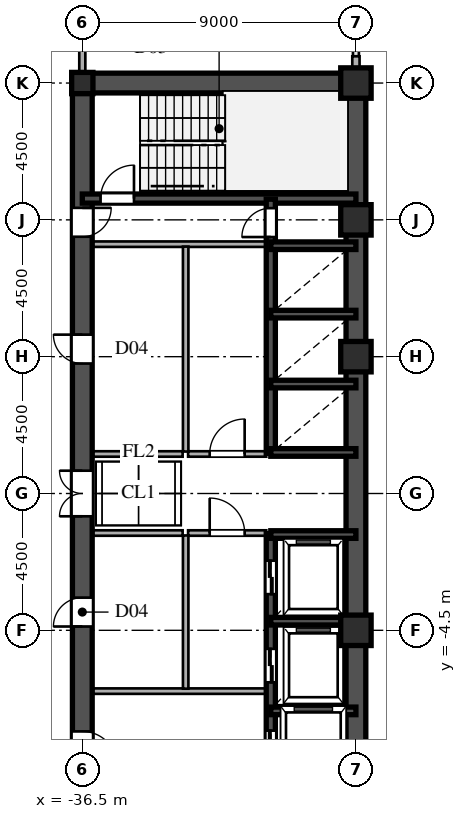
"""IFC4 building model, lengths in metres.
Left out: names, types, materials, properties, quantities, classifications, styles, units other than length and angle.
Written with IfcOpenShell. Run it as: python <this file> out.ifc"""

import sys

from ifc_helpers import new_model, si_unit, direction, frame, frame_2d, origin, origin_2d, place, context, subcontext, project, spatial, rectangle, hollow_rectangle, i_section, extrude, source, transform, mapped, element, fill, save


model = new_model("IFC4")
c1 = context("Model", 3, precision=1e-05, world=origin(), true_north=direction((0.0, 1.0)))
c2 = subcontext(c1, "Body", "Model", "MODEL_VIEW")
j1 = project(units=[si_unit("LENGTHUNIT", "METRE"), si_unit("PLANEANGLEUNIT", "RADIAN")], contexts=[c1])
p1 = place(None, origin())
s1 = spatial("IfcSite", under=j1, at=p1, CompositionType="ELEMENT")
p2 = place(p1, origin())
s2 = spatial("IfcBuilding", under=s1, at=p2, CompositionType="ELEMENT")
p3 = place(p2, frame((0.0, 0.0, 110.4)))
s3 = spatial("IfcBuildingStorey", under=s2, at=p3, CompositionType="ELEMENT", Elevation=110.4)
m1 = source(origin(), c2, "Body", "SweptSolid", [
    extrude(hollow_rectangle(XDim=1.0, YDim=1.0, WallThickness=0.042, at=origin_2d()), origin(), (0.0, 0.0, 1.0), 3.6),
])
for number, where, z_axis, x_axis in (
    (1, (-27.5, -4.5, 0.0), (0.0, 0.0, 1.0), (1.0, 0.0, 0.0)),
    (2, (-27.5, 4.5, 0.0), (0.0, 0.0, 1.0), (1.0, 0.0, 0.0)),
    (3, (-27.5, 9.0, 0.0), (0.0, 0.0, 1.0), (1.0, 0.0, 0.0)),
    (4, (-27.5, 13.5, 0.0), (0.0, 0.0, 1.0), (1.0, 0.0, 0.0)),
):
    element("IfcColumn", number, at=place(p3, frame(where, z_axis=z_axis, x_axis=x_axis)), inside=s3, PredefinedType="COLUMN", context=c2, shape_type="MappedRepresentation", body=[
        mapped(m1, transform((0.0, 0.0, 0.0), scale=1.0)),
    ])
m2 = source(origin(), c2, "Body", "SweptSolid", [
    extrude(i_section(OverallWidth=0.7, OverallDepth=0.7, WebThickness=0.028, FlangeThickness=0.045, at=origin_2d()), origin(), (0.0, 0.0, 1.0), 3.6),
])
p4 = place(p3, frame((-36.5, 13.5, 0.0), z_axis=(0.0, 0.0, 1.0), x_axis=(1.0, 0.0, 0.0)))
e5 = element("IfcColumn", 5, at=p4, inside=s3, PredefinedType="COLUMN", context=c2, shape_type="MappedRepresentation", body=[
    mapped(m2, transform((0.0, 0.0, 0.0), scale=1.0)),
])
p5 = place(p3, frame((-27.5, 13.83, 0.0), z_axis=(0.0, 0.0, 1.0), x_axis=(0.0, 1.0, 0.0)))
e6 = element("IfcWall", 6, at=p5, inside=s3, PredefinedType="SOLIDWALL", context=c2, shape_type="SweptSolid", body=[
    extrude(rectangle(XDim=0.55, YDim=0.24, at=frame_2d((0.275, 0.0))), origin(), (0.0, 0.0, 1.0), 2.88),
])
for number, where, z_axis, x_axis in (
    (7, (-27.5, -13.5, 0.0), (0.0, 0.0, 1.0), (0.0, 1.0, 0.0)),
    (8, (-27.5, 1.3, 0.0), (0.0, 0.0, 1.0), (0.0, 1.0, 0.0)),
):
    element("IfcWall", number, at=place(p3, frame(where, z_axis=z_axis, x_axis=x_axis)), inside=s3, PredefinedType="SHEAR", context=c2, shape_type="SweptSolid", body=[
        extrude(rectangle(XDim=12.2, YDim=0.65, at=frame_2d((6.1, 0.0))), origin(), (0.0, 0.0, 1.0), 3.38),
    ])
p6 = place(p3, frame((-27.5, -1.3, 0.0), z_axis=(0.0, 0.0, 1.0), x_axis=(0.0, 1.0, 0.0)))
e9 = element("IfcWall", 9, at=p6, inside=s3, PredefinedType="SHEAR", context=c2, shape_type="SweptSolid", body=[
    extrude(rectangle(XDim=2.6, YDim=0.65, at=frame_2d((1.3, 0.0))), origin(), (0.0, 0.0, 1.0), 3.38),
])
p7 = place(p3, frame((-36.5, 13.5, 0.0), z_axis=(0.0, 0.0, 1.0), x_axis=(1.0, 0.0, 0.0)))
e10 = element("IfcWall", 10, at=p7, inside=s3, PredefinedType="SHEAR", context=c2, shape_type="SweptSolid", body=[
    extrude(rectangle(XDim=9.0, YDim=0.65, at=frame_2d((4.5, 0.0))), origin(), (0.0, 0.0, 1.0), 3.38),
])
p8 = place(p3, frame((-36.5, -13.65, 0.0), z_axis=(0.0, 0.0, 1.0), x_axis=(0.0, 1.0, 0.0)))
e11 = element("IfcWall", 11, at=p8, inside=s3, PredefinedType="SHEAR", context=c2, shape_type="SweptSolid", body=[
    extrude(rectangle(XDim=7.15, YDim=0.65, at=frame_2d((3.575, 0.0))), origin(), (0.0, 0.0, 1.0), 3.38),
])
p9 = place(p8, frame((4.675, 0.0, 0.0)))
e12 = element("IfcOpeningElement", 12, at=p9, cuts=e11, PredefinedType="OPENING", context=c2, shape_type="SweptSolid", body=[
    extrude(rectangle(XDim=1.15, YDim=2.2, at=frame_2d((0.575, 1.1))), frame((0.0, 0.335, 0.0), z_axis=(0.0, -1.0, 0.0), x_axis=(1.0, 0.0, 0.0)), (0.0, 0.0, 1.0), 0.67),
])
p10 = place(p3, frame((-36.5, -1.3, 0.0), z_axis=(0.0, 0.0, 1.0), x_axis=(0.0, 1.0, 0.0)))
e13 = element("IfcWall", 13, at=p10, inside=s3, PredefinedType="SHEAR", context=c2, shape_type="SweptSolid", body=[
    extrude(rectangle(XDim=2.6, YDim=0.65, at=frame_2d((1.3, 0.0))), origin(), (0.0, 0.0, 1.0), 3.38),
])
p11 = place(p10, frame((0.55, 0.0, 0.0)))
e14 = element("IfcOpeningElement", 14, at=p11, cuts=e13, PredefinedType="OPENING", context=c2, shape_type="SweptSolid", body=[
    extrude(rectangle(XDim=1.5, YDim=2.3, at=frame_2d((0.75, 1.15))), frame((0.0, 0.335, 0.0), z_axis=(0.0, -1.0, 0.0), x_axis=(1.0, 0.0, 0.0)), (0.0, 0.0, 1.0), 0.67),
])
p12 = place(p3, frame((-36.5, 8.2, 0.0), z_axis=(0.0, 0.0, 1.0), x_axis=(0.0, 1.0, 0.0)))
e15 = element("IfcWall", 15, at=p12, inside=s3, PredefinedType="SHEAR", context=c2, shape_type="SweptSolid", body=[
    extrude(rectangle(XDim=5.45, YDim=0.65, at=frame_2d((2.725, 0.0))), origin(), (0.0, 0.0, 1.0), 3.38),
])
p13 = place(p12, frame((0.245, 0.0, 0.0)))
e16 = element("IfcOpeningElement", 16, at=p13, cuts=e15, PredefinedType="OPENING", context=c2, shape_type="SweptSolid", body=[
    extrude(rectangle(XDim=0.95, YDim=2.15, at=frame_2d((0.475, 1.075))), frame((0.0, 0.335, 0.0), z_axis=(0.0, -1.0, 0.0), x_axis=(1.0, 0.0, 0.0)), (0.0, 0.0, 1.0), 0.67),
])
p14 = place(p3, frame((-36.5, -6.5, 0.0), z_axis=(0.0, 0.0, 1.0), x_axis=(0.0, 1.0, 0.0)))
e17 = element("IfcWall", 17, at=p14, inside=s3, PredefinedType="SHEAR", context=c2, shape_type="SweptSolid", body=[
    extrude(rectangle(XDim=5.2, YDim=0.65, at=frame_2d((2.6, 0.0))), origin(), (0.0, 0.0, 1.0), 3.38),
])
p15 = place(p14, frame((2.125, 0.0, 0.0)))
e18 = element("IfcOpeningElement", 18, at=p15, cuts=e17, PredefinedType="OPENING", context=c2, shape_type="SweptSolid", body=[
    extrude(rectangle(XDim=0.95, YDim=2.15, at=frame_2d((0.475, 1.075))), frame((0.0, 0.335, 0.0), z_axis=(0.0, -1.0, 0.0), x_axis=(1.0, 0.0, 0.0)), (0.0, 0.0, 1.0), 0.67),
])
p16 = place(p3, frame((-36.5, 1.3, 0.0), z_axis=(0.0, 0.0, 1.0), x_axis=(0.0, 1.0, 0.0)))
e19 = element("IfcWall", 19, at=p16, inside=s3, PredefinedType="SHEAR", context=c2, shape_type="SweptSolid", body=[
    extrude(rectangle(XDim=6.9, YDim=0.65, at=frame_2d((3.45, 0.0))), origin(), (0.0, 0.0, 1.0), 3.38),
])
p17 = place(p16, frame((2.975, 0.0, 0.0)))
e20 = element("IfcOpeningElement", 20, at=p17, cuts=e19, PredefinedType="OPENING", context=c2, shape_type="SweptSolid", body=[
    extrude(rectangle(XDim=0.95, YDim=2.15, at=frame_2d((0.475, 1.075))), frame((0.0, 0.335, 0.0), z_axis=(0.0, -1.0, 0.0), x_axis=(1.0, 0.0, 0.0)), (0.0, 0.0, 1.0), 0.67),
])
p18 = place(p3, frame((-36.5, 9.7, 0.0), z_axis=(0.0, 0.0, 1.0), x_axis=(1.0, 0.0, 0.0)))
e21 = element("IfcWall", 21, at=p18, inside=s3, PredefinedType="SHEAR", context=c2, shape_type="SweptSolid", body=[
    extrude(rectangle(XDim=9.0, YDim=0.3, at=frame_2d((4.5, 0.0))), origin(), (0.0, 0.0, 1.0), 3.38),
])
p19 = place(p18, frame((0.6, 0.0, 0.0)))
e22 = element("IfcOpeningElement", 22, at=p19, cuts=e21, PredefinedType="OPENING", context=c2, shape_type="SweptSolid", body=[
    extrude(rectangle(XDim=1.1, YDim=2.2, at=frame_2d((0.55, 1.1))), frame((0.0, 0.16, 0.0), z_axis=(0.0, -1.0, 0.0), x_axis=(1.0, 0.0, 0.0)), (0.0, 0.0, 1.0), 0.32),
])
for number, where, z_axis, x_axis in (
    (23, (-30.3, -7.15, 0.0), (0.0, 0.0, 1.0), (1.0, 0.0, 0.0)),
    (24, (-30.3, -4.2, 0.0), (0.0, 0.0, 1.0), (1.0, 0.0, 0.0)),
    (25, (-30.3, -1.35, 0.0), (0.0, 0.0, 1.0), (1.0, 0.0, 0.0)),
    (26, (-30.3, 1.35, 0.0), (0.0, 0.0, 1.0), (1.0, 0.0, 0.0)),
    (27, (-30.3, 3.6, 0.0), (0.0, 0.0, 1.0), (1.0, 0.0, 0.0)),
    (28, (-30.3, 5.9, 0.0), (0.0, 0.0, 1.0), (1.0, 0.0, 0.0)),
    (29, (-30.3, 8.15, 0.0), (0.0, 0.0, 1.0), (1.0, 0.0, 0.0)),
):
    element("IfcWall", number, at=place(p3, frame(where, z_axis=z_axis, x_axis=x_axis)), inside=s3, PredefinedType="SHEAR", context=c2, shape_type="SweptSolid", body=[
        extrude(rectangle(XDim=2.8, YDim=0.25, at=frame_2d((1.4, 0.0))), origin(), (0.0, 0.0, 1.0), 3.38),
    ])
p20 = place(p3, frame((-30.3, -9.68, 0.0), z_axis=(0.0, 0.0, 1.0), x_axis=(0.0, 1.0, 0.0)))
e30 = element("IfcWall", 30, at=p20, inside=s3, PredefinedType="SHEAR", context=c2, shape_type="SweptSolid", body=[
    extrude(rectangle(XDim=2.56, YDim=0.3, at=frame_2d((1.28, 0.0))), origin(), (0.0, 0.0, 1.0), 3.38),
])
p21 = place(p20, frame((0.68, 0.0, 0.0)))
e31 = element("IfcOpeningElement", 31, at=p21, cuts=e30, PredefinedType="OPENING", context=c2, shape_type="SweptSolid", body=[
    extrude(rectangle(XDim=1.2, YDim=2.25, at=frame_2d((0.6, 1.125))), frame((0.0, 0.16, 0.0), z_axis=(0.0, -1.0, 0.0), x_axis=(1.0, 0.0, 0.0)), (0.0, 0.0, 1.0), 0.32),
])
p22 = place(p3, frame((-30.3, -7.12, 0.0), z_axis=(0.0, 0.0, 1.0), x_axis=(0.0, 1.0, 0.0)))
e32 = element("IfcWall", 32, at=p22, inside=s3, PredefinedType="SHEAR", context=c2, shape_type="SweptSolid", body=[
    extrude(rectangle(XDim=2.92, YDim=0.3, at=frame_2d((1.46, 0.0))), origin(), (0.0, 0.0, 1.0), 3.38),
])
p23 = place(p22, frame((0.91, 0.0, 0.0)))
e33 = element("IfcOpeningElement", 33, at=p23, cuts=e32, PredefinedType="OPENING", context=c2, shape_type="SweptSolid", body=[
    extrude(rectangle(XDim=1.1, YDim=2.2, at=frame_2d((0.55, 1.1))), frame((0.0, 0.16, 0.0), z_axis=(0.0, -1.0, 0.0), x_axis=(1.0, 0.0, 0.0)), (0.0, 0.0, 1.0), 0.32),
])
p24 = place(p3, frame((-30.3, -4.2, 0.0), z_axis=(0.0, 0.0, 1.0), x_axis=(0.0, 1.0, 0.0)))
e34 = element("IfcWall", 34, at=p24, inside=s3, PredefinedType="SHEAR", context=c2, shape_type="SweptSolid", body=[
    extrude(rectangle(XDim=2.88, YDim=0.3, at=frame_2d((1.44, 0.0))), origin(), (0.0, 0.0, 1.0), 3.38),
])
p25 = place(p24, frame((0.89, 0.0, 0.0)))
e35 = element("IfcOpeningElement", 35, at=p25, cuts=e34, PredefinedType="OPENING", context=c2, shape_type="SweptSolid", body=[
    extrude(rectangle(XDim=1.1, YDim=2.2, at=frame_2d((0.55, 1.1))), frame((0.0, 0.16, 0.0), z_axis=(0.0, -1.0, 0.0), x_axis=(1.0, 0.0, 0.0)), (0.0, 0.0, 1.0), 0.32),
])
p26 = place(p3, frame((-30.3, 1.32, 0.0), z_axis=(0.0, 0.0, 1.0), x_axis=(0.0, 1.0, 0.0)))
e36 = element("IfcWall", 36, at=p26, inside=s3, PredefinedType="SHEAR", context=c2, shape_type="SweptSolid", body=[
    extrude(rectangle(XDim=2.28, YDim=0.3, at=frame_2d((1.14, 0.0))), origin(), (0.0, 0.0, 1.0), 3.38),
])
p27 = place(p3, frame((-30.3, 3.6, 0.0), z_axis=(0.0, 0.0, 1.0), x_axis=(0.0, 1.0, 0.0)))
e37 = element("IfcWall", 37, at=p27, inside=s3, PredefinedType="SHEAR", context=c2, shape_type="SweptSolid", body=[
    extrude(rectangle(XDim=2.3, YDim=0.3, at=frame_2d((1.15, 0.0))), origin(), (0.0, 0.0, 1.0), 3.38),
])
p28 = place(p3, frame((-30.3, 5.9, 0.0), z_axis=(0.0, 0.0, 1.0), x_axis=(0.0, 1.0, 0.0)))
e38 = element("IfcWall", 38, at=p28, inside=s3, PredefinedType="SHEAR", context=c2, shape_type="SweptSolid", body=[
    extrude(rectangle(XDim=2.25, YDim=0.3, at=frame_2d((1.125, 0.0))), origin(), (0.0, 0.0, 1.0), 3.38),
])
p29 = place(p3, frame((-30.3, 8.15, 0.0), z_axis=(0.0, 0.0, 1.0), x_axis=(0.0, 1.0, 0.0)))
e39 = element("IfcWall", 39, at=p29, inside=s3, PredefinedType="SHEAR", context=c2, shape_type="SweptSolid", body=[
    extrude(rectangle(XDim=1.53, YDim=0.3, at=frame_2d((0.765, 0.0))), origin(), (0.0, 0.0, 1.0), 3.38),
])
p30 = place(p29, frame((0.285, 0.0, 0.0)))
e40 = element("IfcOpeningElement", 40, at=p30, cuts=e39, PredefinedType="OPENING", context=c2, shape_type="SweptSolid", body=[
    extrude(rectangle(XDim=0.95, YDim=2.15, at=frame_2d((0.475, 1.075))), frame((0.0, 0.16, 0.0), z_axis=(0.0, -1.0, 0.0), x_axis=(1.0, 0.0, 0.0)), (0.0, 0.0, 1.0), 0.32),
])
for number, where, z_axis, x_axis in (
    (41, (-36.15, -6.5, 0.0), (0.0, 0.0, 1.0), (1.0, 0.0, 0.0)),
    (42, (-36.15, 8.2, 0.0), (0.0, 0.0, 1.0), (1.0, 0.0, 0.0)),
):
    element("IfcWall", number, at=place(p3, frame(where, z_axis=z_axis, x_axis=x_axis)), inside=s3, PredefinedType="PARTITIONING", context=c2, shape_type="SweptSolid", body=[
        extrude(rectangle(XDim=5.7, YDim=0.18, at=frame_2d((2.85, 0.0))), origin(), (0.0, 0.0, 1.0), 3.38),
    ])
p31 = place(p3, frame((-33.1, -6.42, 0.0), z_axis=(0.0, 0.0, 1.0), x_axis=(0.0, 1.0, 0.0)))
e43 = element("IfcWall", 43, at=p31, inside=s3, PredefinedType="PARTITIONING", context=c2, shape_type="SweptSolid", body=[
    extrude(rectangle(XDim=5.04, YDim=0.18, at=frame_2d((2.52, 0.0))), origin(), (0.0, 0.0, 1.0), 3.38),
])
p32 = place(p3, frame((-33.1, 1.38, 0.0), z_axis=(0.0, 0.0, 1.0), x_axis=(0.0, 1.0, 0.0)))
e44 = element("IfcWall", 44, at=p32, inside=s3, PredefinedType="PARTITIONING", context=c2, shape_type="SweptSolid", body=[
    extrude(rectangle(XDim=6.74, YDim=0.18, at=frame_2d((3.37, 0.0))), origin(), (0.0, 0.0, 1.0), 3.38),
])
p33 = place(p3, frame((-33.02, -1.3, 0.0), z_axis=(0.0, 0.0, 1.0), x_axis=(1.0, 0.0, 0.0)))
e45 = element("IfcWall", 45, at=p33, inside=s3, PredefinedType="PARTITIONING", context=c2, shape_type="SweptSolid", body=[
    extrude(rectangle(XDim=2.57, YDim=0.18, at=frame_2d((1.285, 0.0))), origin(), (0.0, 0.0, 1.0), 3.38),
])
p34 = place(p33, frame((0.71, 0.0, 0.0)))
e46 = element("IfcOpeningElement", 46, at=p34, cuts=e45, PredefinedType="OPENING", context=c2, shape_type="SweptSolid", body=[
    extrude(rectangle(XDim=1.15, YDim=2.2, at=frame_2d((0.575, 1.1))), frame((0.0, 0.1, 0.0), z_axis=(0.0, -1.0, 0.0), x_axis=(1.0, 0.0, 0.0)), (0.0, 0.0, 1.0), 0.2),
])
p35 = place(p3, frame((-33.02, 1.3, 0.0), z_axis=(0.0, 0.0, 1.0), x_axis=(1.0, 0.0, 0.0)))
e47 = element("IfcWall", 47, at=p35, inside=s3, PredefinedType="PARTITIONING", context=c2, shape_type="SweptSolid", body=[
    extrude(rectangle(XDim=2.57, YDim=0.18, at=frame_2d((1.285, 0.0))), origin(), (0.0, 0.0, 1.0), 3.38),
])
p36 = place(p35, frame((0.71, 0.0, 0.0)))
e48 = element("IfcOpeningElement", 48, at=p36, cuts=e47, PredefinedType="OPENING", context=c2, shape_type="SweptSolid", body=[
    extrude(rectangle(XDim=1.15, YDim=2.2, at=frame_2d((0.575, 1.1))), frame((0.0, 0.1, 0.0), z_axis=(0.0, -1.0, 0.0), x_axis=(1.0, 0.0, 0.0)), (0.0, 0.0, 1.0), 0.2),
])
for number, where, z_axis, x_axis in (
    (49, (-36.15, -1.3, 0.0), (0.0, 0.0, 1.0), (1.0, 0.0, 0.0)),
    (50, (-36.15, 1.3, 0.0), (0.0, 0.0, 1.0), (1.0, 0.0, 0.0)),
):
    element("IfcWall", number, at=place(p3, frame(where, z_axis=z_axis, x_axis=x_axis)), inside=s3, PredefinedType="PARTITIONING", context=c2, shape_type="SweptSolid", body=[
        extrude(rectangle(XDim=2.95, YDim=0.18, at=frame_2d((1.475, 0.0))), origin(), (0.0, 0.0, 1.0), 3.38),
    ])
p37 = place(p3, frame((-36.5, 13.83, 0.0), z_axis=(0.0, 0.0, 1.0), x_axis=(0.0, 1.0, 0.0)))
e51 = element("IfcWall", 51, at=p37, inside=s3, PredefinedType="PARTITIONING", context=c2, shape_type="SweptSolid", body=[
    extrude(rectangle(XDim=1.685, YDim=0.2, at=frame_2d((0.842, 0.0))), origin(), (0.0, 0.0, 1.0), 2.78),
])
m3 = source(origin(), c2, "Body", "SweptSolid", [
    extrude(rectangle(XDim=1.15, YDim=2.2, at=frame_2d((0.575, 1.1))), frame((0.0, 0.025, 0.0), z_axis=(0.0, -1.0, 0.0), x_axis=(1.0, 0.0, 0.0)), (0.0, 0.0, 1.0), 0.05),
])
p38 = place(p9, frame((1.15, 0.0, 0.0), z_axis=(0.0, 0.0, 1.0), x_axis=(-1.0, 0.0, 0.0)))
e52 = element("IfcDoor", 52, at=p38, inside=s3, OperationType="SINGLE_SWING_LEFT", PredefinedType="DOOR", context=c2, shape_type="MappedRepresentation", body=[
    mapped(m3, transform((0.0, 0.0, 0.0), scale=1.0)),
])
fill(e12, e52)
m4 = source(origin(), c2, "Body", "SweptSolid", [
    extrude(rectangle(XDim=1.5, YDim=2.3, at=frame_2d((0.75, 1.15))), frame((0.0, 0.025, 0.0), z_axis=(0.0, -1.0, 0.0), x_axis=(1.0, 0.0, 0.0)), (0.0, 0.0, 1.0), 0.05),
])
p39 = place(p11, origin())
e53 = element("IfcDoor", 53, at=p39, inside=s3, OperationType="DOUBLE_SWING_LEFT", PredefinedType="DOOR", context=c2, shape_type="MappedRepresentation", body=[
    mapped(m4, transform((0.0, 0.0, 0.0), scale=1.0)),
])
fill(e14, e53)
m5 = source(origin(), c2, "Body", "SweptSolid", [
    extrude(rectangle(XDim=0.95, YDim=2.15, at=frame_2d((0.475, 1.075))), frame((0.0, 0.025, 0.0), z_axis=(0.0, -1.0, 0.0), x_axis=(1.0, 0.0, 0.0)), (0.0, 0.0, 1.0), 0.05),
])
p40 = place(p13, frame((0.95, 0.0, 0.0), z_axis=(0.0, 0.0, 1.0), x_axis=(-1.0, 0.0, 0.0)))
e54 = element("IfcDoor", 54, at=p40, inside=s3, OperationType="SINGLE_SWING_RIGHT", PredefinedType="DOOR", context=c2, shape_type="MappedRepresentation", body=[
    mapped(m5, transform((0.0, 0.0, 0.0), scale=1.0)),
])
fill(e16, e54)
p41 = place(p15, origin())
e55 = element("IfcDoor", 55, at=p41, inside=s3, OperationType="SINGLE_SWING_LEFT", PredefinedType="DOOR", context=c2, shape_type="MappedRepresentation", body=[
    mapped(m5, transform((0.0, 0.0, 0.0), scale=1.0)),
])
fill(e18, e55)
p42 = place(p17, origin())
e56 = element("IfcDoor", 56, at=p42, inside=s3, OperationType="SINGLE_SWING_RIGHT", PredefinedType="DOOR", context=c2, shape_type="MappedRepresentation", body=[
    mapped(m5, transform((0.0, 0.0, 0.0), scale=1.0)),
])
fill(e20, e56)
m6 = source(origin(), c2, "Body", "SweptSolid", [
    extrude(rectangle(XDim=1.1, YDim=2.2, at=frame_2d((0.55, 1.1))), frame((0.0, 0.025, 0.0), z_axis=(0.0, -1.0, 0.0), x_axis=(1.0, 0.0, 0.0)), (0.0, 0.0, 1.0), 0.05),
])
p43 = place(p19, origin())
e57 = element("IfcDoor", 57, at=p43, inside=s3, OperationType="SINGLE_SWING_RIGHT", PredefinedType="DOOR", context=c2, shape_type="MappedRepresentation", body=[
    mapped(m6, transform((0.0, 0.0, 0.0), scale=1.0)),
])
fill(e22, e57)
m7 = source(origin(), c2, "Body", "SweptSolid", [
    extrude(rectangle(XDim=1.2, YDim=2.25, at=frame_2d((0.6, 1.125))), frame((0.0, 0.025, 0.0), z_axis=(0.0, -1.0, 0.0), x_axis=(1.0, 0.0, 0.0)), (0.0, 0.0, 1.0), 0.05),
])
p44 = place(p21, origin())
e58 = element("IfcDoor", 58, at=p44, inside=s3, OperationType="DOUBLE_DOOR_SLIDING", PredefinedType="DOOR", context=c2, shape_type="MappedRepresentation", body=[
    mapped(m7, transform((0.0, 0.0, 0.0), scale=1.0)),
])
fill(e31, e58)
m8 = source(origin(), c2, "Body", "SweptSolid", [
    extrude(rectangle(XDim=1.1, YDim=2.2, at=frame_2d((0.55, 1.1))), frame((0.0, 0.025, 0.0), z_axis=(0.0, -1.0, 0.0), x_axis=(1.0, 0.0, 0.0)), (0.0, 0.0, 1.0), 0.05),
])
p45 = place(p23, origin())
e59 = element("IfcDoor", 59, at=p45, inside=s3, OperationType="DOUBLE_DOOR_SLIDING", PredefinedType="DOOR", context=c2, shape_type="MappedRepresentation", body=[
    mapped(m8, transform((0.0, 0.0, 0.0), scale=1.0)),
])
fill(e33, e59)
p46 = place(p25, origin())
e60 = element("IfcDoor", 60, at=p46, inside=s3, OperationType="DOUBLE_DOOR_SLIDING", PredefinedType="DOOR", context=c2, shape_type="MappedRepresentation", body=[
    mapped(m8, transform((0.0, 0.0, 0.0), scale=1.0)),
])
fill(e35, e60)
p47 = place(p30, origin())
e61 = element("IfcDoor", 61, at=p47, inside=s3, OperationType="SINGLE_SWING_LEFT", PredefinedType="DOOR", context=c2, shape_type="MappedRepresentation", body=[
    mapped(m5, transform((0.0, 0.0, 0.0), scale=1.0)),
])
fill(e40, e61)
p48 = place(p34, origin())
e62 = element("IfcDoor", 62, at=p48, inside=s3, OperationType="SINGLE_SWING_LEFT", PredefinedType="DOOR", context=c2, shape_type="MappedRepresentation", body=[
    mapped(m3, transform((0.0, 0.0, 0.0), scale=1.0)),
])
fill(e46, e62)
p49 = place(p36, origin())
e63 = element("IfcDoor", 63, at=p49, inside=s3, OperationType="SINGLE_SWING_RIGHT", PredefinedType="DOOR", context=c2, shape_type="MappedRepresentation", body=[
    mapped(m3, transform((0.0, 0.0, 0.0), scale=1.0)),
])
fill(e48, e63)
save(model, sys.argv[1])
